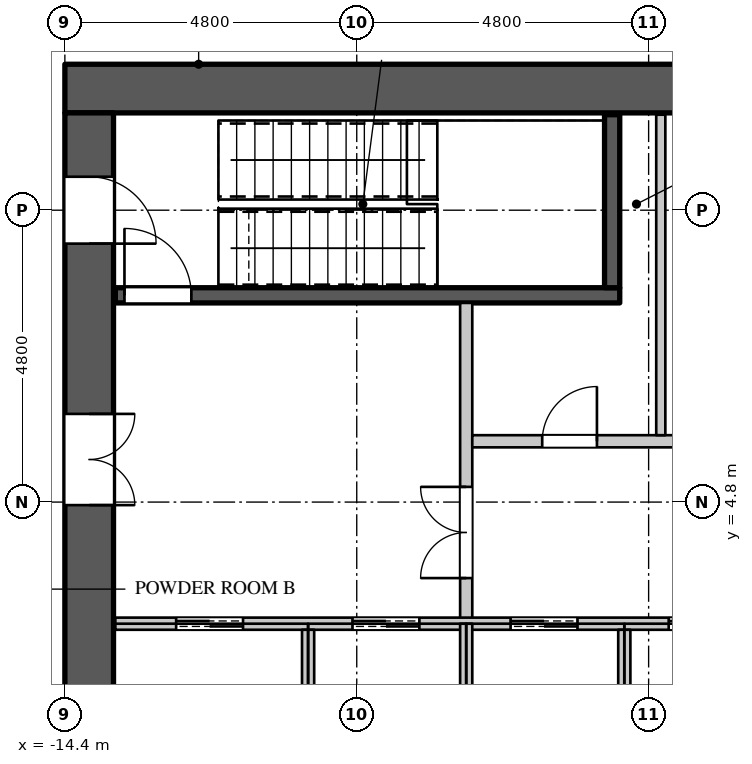
"""IFC4 building model, lengths in metres.
Left out: names, types, materials, properties, quantities, classifications, styles, units other than length and angle.
Written with IfcOpenShell. Run it as: python <this file> out.ifc"""

import sys

from ifc_helpers import new_model, si_unit, direction, frame, frame_2d, origin, place, context, subcontext, project, spatial, rectangle, extrude, element, fill, save


model = new_model("IFC4")
c1 = context("Model", 3, precision=1e-05, world=origin(), true_north=direction((0.0, 1.0)))
c2 = subcontext(c1, "Body", "Model", "MODEL_VIEW")
j1 = project(units=[si_unit("LENGTHUNIT", "METRE"), si_unit("PLANEANGLEUNIT", "RADIAN")], contexts=[c1])
p1 = place(None, origin())
s1 = spatial("IfcSite", under=j1, at=p1, CompositionType="ELEMENT")
p2 = place(p1, origin())
s2 = spatial("IfcBuilding", under=s1, at=p2, CompositionType="ELEMENT")
p3 = place(p2, frame((0.0, 0.0, 119.1)))
s3 = spatial("IfcBuildingStorey", under=s2, at=p3, CompositionType="ELEMENT", Elevation=119.1)
p4 = place(p3, frame((-14.4, 11.6, 0.0), z_axis=(0.0, 0.0, 1.0), x_axis=(1.0, 0.0, 0.0)))
e1 = element("IfcWall", 1, at=p4, inside=s3, PredefinedType="SHEAR", context=c2, shape_type="SweptSolid", body=[
    extrude(rectangle(XDim=28.8, YDim=0.8, at=frame_2d((14.4, 0.0))), origin(), (0.0, 0.0, 1.0), 4.2),
])
p5 = place(p3, frame((-14.0, -11.2, 0.0), z_axis=(0.0, 0.0, 1.0), x_axis=(0.0, 1.0, 0.0)))
e2 = element("IfcWall", 2, at=p5, inside=s3, PredefinedType="SHEAR", context=c2, shape_type="SweptSolid", body=[
    extrude(rectangle(XDim=22.4, YDim=0.8, at=frame_2d((11.2, 0.0))), origin(), (0.0, 0.0, 1.0), 4.2),
])
p6 = place(p5, frame((20.25, 0.0, 0.0)))
e3 = element("IfcOpeningElement", 3, at=p6, cuts=e2, PredefinedType="OPENING", context=c2, shape_type="SweptSolid", body=[
    extrude(rectangle(XDim=1.1, YDim=2.2, at=frame_2d((0.55, 1.1))), frame((0.0, 0.41, 0.0), z_axis=(0.0, -1.0, 0.0), x_axis=(1.0, 0.0, 0.0)), (0.0, 0.0, 1.0), 0.82),
])
p7 = place(p5, frame((1.05, 0.0, 0.0)))
e4 = element("IfcOpeningElement", 4, at=p7, cuts=e2, PredefinedType="OPENING", context=c2, shape_type="SweptSolid", body=[
    extrude(rectangle(XDim=1.1, YDim=2.2, at=frame_2d((0.55, 1.1))), frame((0.0, 0.41, 0.0), z_axis=(0.0, -1.0, 0.0), x_axis=(1.0, 0.0, 0.0)), (0.0, 0.0, 1.0), 0.82),
])
p8 = place(p5, frame((15.95, 0.0, 0.0)))
e5 = element("IfcOpeningElement", 5, at=p8, cuts=e2, PredefinedType="OPENING", context=c2, shape_type="SweptSolid", body=[
    extrude(rectangle(XDim=1.5, YDim=2.4, at=frame_2d((0.75, 1.2))), frame((0.0, 0.41, 0.0), z_axis=(0.0, -1.0, 0.0), x_axis=(1.0, 0.0, 0.0)), (0.0, 0.0, 1.0), 0.82),
])
p9 = place(p5, frame((4.95, 0.0, 0.0)))
e6 = element("IfcOpeningElement", 6, at=p9, cuts=e2, PredefinedType="OPENING", context=c2, shape_type="SweptSolid", body=[
    extrude(rectangle(XDim=1.5, YDim=2.4, at=frame_2d((0.75, 1.2))), frame((0.0, 0.41, 0.0), z_axis=(0.0, -1.0, 0.0), x_axis=(1.0, 0.0, 0.0)), (0.0, 0.0, 1.0), 0.82),
])
p10 = place(p3, frame((-7.8, 2.8, 0.0), z_axis=(0.0, 0.0, 1.0), x_axis=(0.0, 1.0, 0.0)))
e7 = element("IfcWall", 7, at=p10, inside=s3, PredefinedType="PARTITIONING", context=c2, shape_type="SweptSolid", body=[
    extrude(rectangle(XDim=5.275, YDim=0.2, at=frame_2d((2.637, 0.0))), origin(), (0.0, 0.0, 1.0), 3.95),
])
p11 = place(p10, frame((0.75, 0.0, 0.0)))
e8 = element("IfcOpeningElement", 8, at=p11, cuts=e7, PredefinedType="OPENING", context=c2, shape_type="SweptSolid", body=[
    extrude(rectangle(XDim=1.5, YDim=2.4, at=frame_2d((0.75, 1.2))), frame((0.0, 0.11, 0.0), z_axis=(0.0, -1.0, 0.0), x_axis=(1.0, 0.0, 0.0)), (0.0, 0.0, 1.0), 0.22),
])
p12 = place(p3, frame((-7.7, 5.8, 0.0), z_axis=(0.0, 0.0, 1.0), x_axis=(1.0, 0.0, 0.0)))
e9 = element("IfcWall", 9, at=p12, inside=s3, PredefinedType="PARTITIONING", context=c2, shape_type="SweptSolid", body=[
    extrude(rectangle(XDim=11.32, YDim=0.2, at=frame_2d((5.66, 0.0))), origin(), (0.0, 0.0, 1.0), 3.95),
])
p13 = place(p12, frame((1.15, 0.0, 0.0)))
e10 = element("IfcOpeningElement", 10, at=p13, cuts=e9, PredefinedType="OPENING", context=c2, shape_type="SweptSolid", body=[
    extrude(rectangle(XDim=0.9, YDim=2.2, at=frame_2d((0.45, 1.1))), frame((0.0, 0.11, 0.0), z_axis=(0.0, -1.0, 0.0), x_axis=(1.0, 0.0, 0.0)), (0.0, 0.0, 1.0), 0.22),
])
p14 = place(p12, frame((4.55, 0.0, 0.0)))
e11 = element("IfcOpeningElement", 11, at=p14, cuts=e9, PredefinedType="OPENING", context=c2, shape_type="SweptSolid", body=[
    extrude(rectangle(XDim=0.9, YDim=2.2, at=frame_2d((0.45, 1.1))), frame((0.0, 0.11, 0.0), z_axis=(0.0, -1.0, 0.0), x_axis=(1.0, 0.0, 0.0)), (0.0, 0.0, 1.0), 0.22),
])
p15 = place(p12, frame((8.55, 0.0, 0.0)))
e12 = element("IfcOpeningElement", 12, at=p15, cuts=e9, PredefinedType="OPENING", context=c2, shape_type="SweptSolid", body=[
    extrude(rectangle(XDim=0.9, YDim=2.2, at=frame_2d((0.45, 1.1))), frame((0.0, 0.11, 0.0), z_axis=(0.0, -1.0, 0.0), x_axis=(1.0, 0.0, 0.0)), (0.0, 0.0, 1.0), 0.22),
])
p16 = place(p3, frame((-4.6, 5.9, 0.0), z_axis=(0.0, 0.0, 1.0), x_axis=(0.0, 1.0, 0.0)))
e13 = element("IfcWall", 13, at=p16, inside=s3, PredefinedType="PARTITIONING", context=c2, shape_type="SweptSolid", body=[
    extrude(rectangle(XDim=5.27, YDim=0.15, at=frame_2d((2.635, 0.0))), origin(), (0.0, 0.0, 1.0), 3.95),
])
p17 = place(p3, frame((-13.57, 2.8, 0.0), z_axis=(0.0, 0.0, 1.0), x_axis=(1.0, 0.0, 0.0)))
e14 = element("IfcWall", 14, at=p17, inside=s3, PredefinedType="PARTITIONING", context=c2, shape_type="SweptSolid", body=[
    extrude(rectangle(XDim=23.97, YDim=0.2, at=frame_2d((11.985, 0.0))), origin(), (0.0, 0.0, 1.0), 3.95),
])
p18 = place(p17, frame((1.0, 0.0, 0.0)))
e15 = element("IfcOpeningElement", 15, at=p18, cuts=e14, PredefinedType="OPENING", context=c2, shape_type="SweptSolid", body=[
    extrude(rectangle(XDim=1.1, YDim=2.2, at=frame_2d((0.55, 1.1))), frame((0.0, 0.11, 0.0), z_axis=(0.0, -1.0, 0.0), x_axis=(1.0, 0.0, 0.0)), (0.0, 0.0, 1.0), 0.22),
])
p19 = place(p17, frame((3.9, 0.0, 0.0)))
e16 = element("IfcOpeningElement", 16, at=p19, cuts=e14, PredefinedType="OPENING", context=c2, shape_type="SweptSolid", body=[
    extrude(rectangle(XDim=1.1, YDim=2.2, at=frame_2d((0.55, 1.1))), frame((0.0, 0.11, 0.0), z_axis=(0.0, -1.0, 0.0), x_axis=(1.0, 0.0, 0.0)), (0.0, 0.0, 1.0), 0.22),
])
p20 = place(p17, frame((6.5, 0.0, 0.0)))
e17 = element("IfcOpeningElement", 17, at=p20, cuts=e14, PredefinedType="OPENING", context=c2, shape_type="SweptSolid", body=[
    extrude(rectangle(XDim=1.1, YDim=2.2, at=frame_2d((0.55, 1.1))), frame((0.0, 0.11, 0.0), z_axis=(0.0, -1.0, 0.0), x_axis=(1.0, 0.0, 0.0)), (0.0, 0.0, 1.0), 0.22),
])
p21 = place(p17, frame((9.1, 0.0, 0.0)))
e18 = element("IfcOpeningElement", 18, at=p21, cuts=e14, PredefinedType="OPENING", context=c2, shape_type="SweptSolid", body=[
    extrude(rectangle(XDim=1.1, YDim=2.2, at=frame_2d((0.55, 1.1))), frame((0.0, 0.11, 0.0), z_axis=(0.0, -1.0, 0.0), x_axis=(1.0, 0.0, 0.0)), (0.0, 0.0, 1.0), 0.22),
])
p22 = place(p17, frame((11.7, 0.0, 0.0)))
e19 = element("IfcOpeningElement", 19, at=p22, cuts=e14, PredefinedType="OPENING", context=c2, shape_type="SweptSolid", body=[
    extrude(rectangle(XDim=1.1, YDim=2.2, at=frame_2d((0.55, 1.1))), frame((0.0, 0.11, 0.0), z_axis=(0.0, -1.0, 0.0), x_axis=(1.0, 0.0, 0.0)), (0.0, 0.0, 1.0), 0.22),
])
p23 = place(p17, frame((14.3, 0.0, 0.0)))
e20 = element("IfcOpeningElement", 20, at=p23, cuts=e14, PredefinedType="OPENING", context=c2, shape_type="SweptSolid", body=[
    extrude(rectangle(XDim=1.1, YDim=2.2, at=frame_2d((0.55, 1.1))), frame((0.0, 0.11, 0.0), z_axis=(0.0, -1.0, 0.0), x_axis=(1.0, 0.0, 0.0)), (0.0, 0.0, 1.0), 0.22),
])
p24 = place(p17, frame((16.9, 0.0, 0.0)))
e21 = element("IfcOpeningElement", 21, at=p24, cuts=e14, PredefinedType="OPENING", context=c2, shape_type="SweptSolid", body=[
    extrude(rectangle(XDim=1.1, YDim=2.2, at=frame_2d((0.55, 1.1))), frame((0.0, 0.11, 0.0), z_axis=(0.0, -1.0, 0.0), x_axis=(1.0, 0.0, 0.0)), (0.0, 0.0, 1.0), 0.22),
])
p25 = place(p17, frame((19.5, 0.0, 0.0)))
e22 = element("IfcOpeningElement", 22, at=p25, cuts=e14, PredefinedType="OPENING", context=c2, shape_type="SweptSolid", body=[
    extrude(rectangle(XDim=1.1, YDim=2.2, at=frame_2d((0.55, 1.1))), frame((0.0, 0.11, 0.0), z_axis=(0.0, -1.0, 0.0), x_axis=(1.0, 0.0, 0.0)), (0.0, 0.0, 1.0), 0.22),
])
p26 = place(p3, frame((-10.4, 0.0, 0.0), z_axis=(0.0, 0.0, 1.0), x_axis=(0.0, 1.0, 0.0)))
e23 = element("IfcWall", 23, at=p26, inside=s3, PredefinedType="PARTITIONING", context=c2, shape_type="SweptSolid", body=[
    extrude(rectangle(XDim=2.7, YDim=0.2, at=frame_2d((1.35, 0.0))), origin(), (0.0, 0.0, 1.0), 3.95),
])
p27 = place(p3, frame((-7.8, 0.0, 0.0), z_axis=(0.0, 0.0, 1.0), x_axis=(0.0, 1.0, 0.0)))
e24 = element("IfcWall", 24, at=p27, inside=s3, PredefinedType="PARTITIONING", context=c2, shape_type="SweptSolid", body=[
    extrude(rectangle(XDim=2.8, YDim=0.2, at=frame_2d((1.4, 0.0))), origin(), (0.0, 0.0, 1.0), 3.95),
])
p28 = place(p3, frame((-5.2, 0.1, 0.0), z_axis=(0.0, 0.0, 1.0), x_axis=(0.0, 1.0, 0.0)))
e25 = element("IfcWall", 25, at=p28, inside=s3, PredefinedType="PARTITIONING", context=c2, shape_type="SweptSolid", body=[
    extrude(rectangle(XDim=2.6, YDim=0.2, at=frame_2d((1.3, 0.0))), origin(), (0.0, 0.0, 1.0), 3.95),
])
p29 = place(p3, frame((-13.57, 8.2, 0.0), z_axis=(0.0, 0.0, 1.0), x_axis=(1.0, 0.0, 0.0)))
e26 = element("IfcWall", 26, at=p29, inside=s3, PredefinedType="SHEAR", context=c2, shape_type="SweptSolid", body=[
    extrude(rectangle(XDim=8.295, YDim=0.25, at=frame_2d((4.147, 0.0))), origin(), (0.0, 0.0, 1.0), 3.95),
])
p30 = place(p29, frame((0.15, 0.0, 0.0)))
e27 = element("IfcOpeningElement", 27, at=p30, cuts=e26, PredefinedType="OPENING", context=c2, shape_type="SweptSolid", body=[
    extrude(rectangle(XDim=1.1, YDim=2.2, at=frame_2d((0.55, 1.1))), frame((0.0, 0.135, 0.0), z_axis=(0.0, -1.0, 0.0), x_axis=(1.0, 0.0, 0.0)), (0.0, 0.0, 1.0), 0.27),
])
p31 = place(p3, frame((-5.4, 8.325, 0.0), z_axis=(0.0, 0.0, 1.0), x_axis=(0.0, 1.0, 0.0)))
e28 = element("IfcWall", 28, at=p31, inside=s3, PredefinedType="SHEAR", context=c2, shape_type="SweptSolid", body=[
    extrude(rectangle(XDim=2.845, YDim=0.25, at=frame_2d((1.422, 0.0))), origin(), (0.0, 0.0, 1.0), 3.95),
])
p32 = place(p13, origin())
e29 = element("IfcDoor", 29, at=p32, inside=s3, OperationType="SINGLE_SWING_RIGHT", PredefinedType="DOOR", context=c2, shape_type="SweptSolid", body=[
    extrude(rectangle(XDim=0.9, YDim=2.2, at=frame_2d((0.45, 1.1))), frame((0.0, 0.025, 0.0), z_axis=(0.0, -1.0, 0.0), x_axis=(1.0, 0.0, 0.0)), (0.0, 0.0, 1.0), 0.05),
])
fill(e10, e29)
p33 = place(p18, origin())
e30 = element("IfcDoor", 30, at=p33, inside=s3, OperationType="DOUBLE_DOOR_SLIDING", PredefinedType="DOOR", context=c2, shape_type="SweptSolid", body=[
    extrude(rectangle(XDim=1.1, YDim=2.2, at=frame_2d((0.55, 1.1))), frame((0.0, 0.025, 0.0), z_axis=(0.0, -1.0, 0.0), x_axis=(1.0, 0.0, 0.0)), (0.0, 0.0, 1.0), 0.05),
])
fill(e15, e30)
p34 = place(p19, origin())
e31 = element("IfcDoor", 31, at=p34, inside=s3, OperationType="DOUBLE_DOOR_SLIDING", PredefinedType="DOOR", context=c2, shape_type="SweptSolid", body=[
    extrude(rectangle(XDim=1.1, YDim=2.2, at=frame_2d((0.55, 1.1))), frame((0.0, 0.025, 0.0), z_axis=(0.0, -1.0, 0.0), x_axis=(1.0, 0.0, 0.0)), (0.0, 0.0, 1.0), 0.05),
])
fill(e16, e31)
p35 = place(p20, origin())
e32 = element("IfcDoor", 32, at=p35, inside=s3, OperationType="DOUBLE_DOOR_SLIDING", PredefinedType="DOOR", context=c2, shape_type="SweptSolid", body=[
    extrude(rectangle(XDim=1.1, YDim=2.2, at=frame_2d((0.55, 1.1))), frame((0.0, 0.025, 0.0), z_axis=(0.0, -1.0, 0.0), x_axis=(1.0, 0.0, 0.0)), (0.0, 0.0, 1.0), 0.05),
])
fill(e17, e32)
p36 = place(p21, origin())
e33 = element("IfcDoor", 33, at=p36, inside=s3, OperationType="DOUBLE_DOOR_SLIDING", PredefinedType="DOOR", context=c2, shape_type="SweptSolid", body=[
    extrude(rectangle(XDim=1.1, YDim=2.2, at=frame_2d((0.55, 1.1))), frame((0.0, 0.025, 0.0), z_axis=(0.0, -1.0, 0.0), x_axis=(1.0, 0.0, 0.0)), (0.0, 0.0, 1.0), 0.05),
])
fill(e18, e33)
p37 = place(p30, origin())
e34 = element("IfcDoor", 34, at=p37, inside=s3, OperationType="SINGLE_SWING_LEFT", PredefinedType="DOOR", context=c2, shape_type="SweptSolid", body=[
    extrude(rectangle(XDim=1.1, YDim=2.2, at=frame_2d((0.55, 1.1))), frame((0.0, 0.025, 0.0), z_axis=(0.0, -1.0, 0.0), x_axis=(1.0, 0.0, 0.0)), (0.0, 0.0, 1.0), 0.05),
])
fill(e27, e34)
p38 = place(p11, origin())
e35 = element("IfcDoor", 35, at=p38, inside=s3, OperationType="DOUBLE_DOOR_SINGLE_SWING", PredefinedType="DOOR", context=c2, shape_type="SweptSolid", body=[
    extrude(rectangle(XDim=1.5, YDim=2.4, at=frame_2d((0.75, 1.2))), frame((0.0, 0.025, 0.0), z_axis=(0.0, -1.0, 0.0), x_axis=(1.0, 0.0, 0.0)), (0.0, 0.0, 1.0), 0.05),
])
fill(e8, e35)
p39 = place(p6, origin())
e36 = element("IfcDoor", 36, at=p39, inside=s3, OperationType="SINGLE_SWING_RIGHT", PredefinedType="DOOR", context=c2, shape_type="SweptSolid", body=[
    extrude(rectangle(XDim=1.1, YDim=2.2, at=frame_2d((0.55, 1.1))), frame((0.0, -0.345, 0.0), z_axis=(0.0, -1.0, 0.0), x_axis=(1.0, 0.0, 0.0)), (0.0, 0.0, 1.0), 0.05),
])
fill(e3, e36)
p40 = place(p8, origin())
e37 = element("IfcDoor", 37, at=p40, inside=s3, OperationType="DOUBLE_DOOR_SINGLE_SWING", PredefinedType="DOOR", context=c2, shape_type="SweptSolid", body=[
    extrude(rectangle(XDim=1.5, YDim=2.4, at=frame_2d((0.75, 1.2))), frame((0.0, -0.345, 0.0), z_axis=(0.0, -1.0, 0.0), x_axis=(1.0, 0.0, 0.0)), (0.0, 0.0, 1.0), 0.05),
])
fill(e5, e37)
save(model, sys.argv[1])
